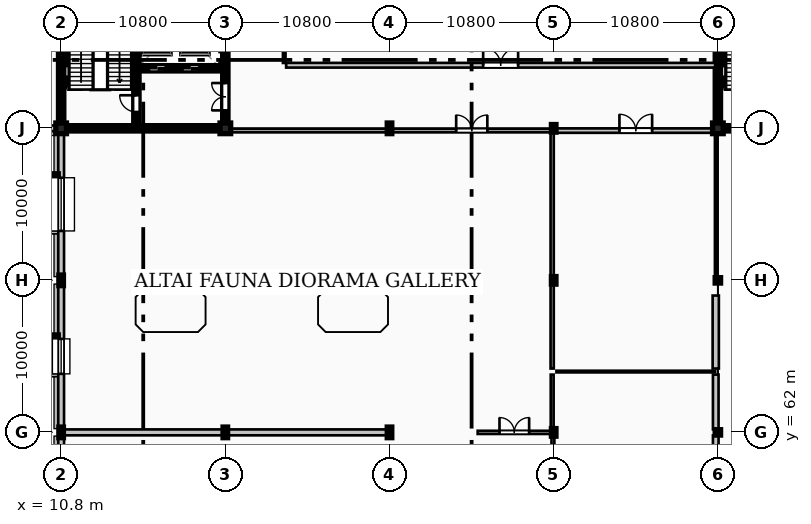
"""IFC4 building model, lengths in metres.
Left out: names, types, materials, properties, quantities, classifications, styles, units other than length and angle.
Written with IfcOpenShell. Run it as: python <this file> out.ifc"""

import sys

from ifc_helpers import new_model, si_unit, direction, frame, frame_2d, origin, origin_2d, place, context, subcontext, project, spatial, rectangle, hollow_circle, i_section, extrude, element, fill, save


model = new_model("IFC4")
c1 = context("Model", 3, precision=1e-05, world=origin(), true_north=direction((0.0, 1.0)))
c2 = subcontext(c1, "Body", "Model", "MODEL_VIEW")
j1 = project(units=[si_unit("LENGTHUNIT", "METRE"), si_unit("PLANEANGLEUNIT", "RADIAN")], contexts=[c1])
p1 = place(None, origin())
s1 = spatial("IfcSite", under=j1, at=p1, CompositionType="ELEMENT")
p2 = place(p1, origin())
s2 = spatial("IfcBuilding", under=s1, at=p2, CompositionType="ELEMENT")
p3 = place(p2, frame((0.0, 0.0, 4.8)))
s3 = spatial("IfcBuildingStorey", under=s2, at=p3, CompositionType="ELEMENT", Elevation=4.8)
for number, where, z_axis, x_axis in (
    (1, (10.8, 62.0, 0.0), (0.0, 0.0, 1.0), (1.0, 0.0, 0.0)),
    (2, (10.8, 72.0, 0.0), (0.0, 0.0, 1.0), (1.0, 0.0, 0.0)),
):
    element("IfcColumn", number, at=place(p3, frame(where, z_axis=z_axis, x_axis=x_axis)), inside=s3, PredefinedType="COLUMN", context=c2, shape_type="SweptSolid", body=[
        extrude(i_section(OverallWidth=0.3, OverallDepth=0.7, WebThickness=0.017, FlangeThickness=0.032, FilletRadius=0.027, at=origin_2d()), origin(), (0.0, 0.0, 1.0), 4.8),
    ])
p4 = place(p3, frame((10.8, 82.0, 0.0), z_axis=(0.0, 0.0, 1.0), x_axis=(1.0, 0.0, 0.0)))
e3 = element("IfcColumn", 3, at=p4, inside=s3, PredefinedType="COLUMN", context=c2, shape_type="SweptSolid", body=[
    extrude(rectangle(XDim=0.7, YDim=0.7, at=origin_2d()), origin(), (0.0, 0.0, 1.0), 4.8),
])
for number, where, z_axis, x_axis in (
    (4, (21.6, 62.0, 0.0), (0.0, 0.0, 1.0), (1.0, 0.0, 0.0)),
    (5, (21.6, 72.0, 0.0), (0.0, 0.0, 1.0), (1.0, 0.0, 0.0)),
):
    element("IfcColumn", number, at=place(p3, frame(where, z_axis=z_axis, x_axis=x_axis)), inside=s3, PredefinedType="COLUMN", context=c2, shape_type="SweptSolid", body=[
        extrude(i_section(OverallWidth=0.3, OverallDepth=0.7, WebThickness=0.017, FlangeThickness=0.032, FilletRadius=0.027, at=origin_2d()), origin(), (0.0, 0.0, 1.0), 4.8),
    ])
p5 = place(p3, frame((21.6, 82.0, 0.0), z_axis=(0.0, 0.0, 1.0), x_axis=(1.0, 0.0, 0.0)))
e6 = element("IfcColumn", 6, at=p5, inside=s3, PredefinedType="COLUMN", context=c2, shape_type="SweptSolid", body=[
    extrude(rectangle(XDim=0.7, YDim=0.7, at=origin_2d()), origin(), (0.0, 0.0, 1.0), 4.8),
])
for number, where, z_axis, x_axis in (
    (7, (32.4, 62.0, 0.0), (0.0, 0.0, 1.0), (1.0, 0.0, 0.0)),
    (8, (32.4, 72.0, 0.0), (0.0, 0.0, 1.0), (1.0, 0.0, 0.0)),
    (9, (32.4, 82.0, 0.0), (0.0, 0.0, 1.0), (1.0, 0.0, 0.0)),
):
    element("IfcColumn", number, at=place(p3, frame(where, z_axis=z_axis, x_axis=x_axis)), inside=s3, PredefinedType="COLUMN", context=c2, shape_type="SweptSolid", body=[
        extrude(i_section(OverallWidth=0.3, OverallDepth=0.7, WebThickness=0.017, FlangeThickness=0.032, FilletRadius=0.027, at=origin_2d()), origin(), (0.0, 0.0, 1.0), 4.8),
    ])
for number, where, z_axis, x_axis in (
    (10, (43.2, 62.0, 0.0), (0.0, 0.0, 1.0), (1.0, 0.0, 0.0)),
    (11, (43.2, 72.0, 0.0), (0.0, 0.0, 1.0), (1.0, 0.0, 0.0)),
    (12, (43.2, 82.0, 0.0), (0.0, 0.0, 1.0), (1.0, 0.0, 0.0)),
):
    element("IfcColumn", number, at=place(p3, frame(where, z_axis=z_axis, x_axis=x_axis)), inside=s3, PredefinedType="COLUMN", context=c2, shape_type="SweptSolid", body=[
        extrude(i_section(OverallWidth=0.3, OverallDepth=0.5, WebThickness=0.014, FlangeThickness=0.028, FilletRadius=0.027, at=origin_2d()), origin(), (0.0, 0.0, 1.0), 4.8),
    ])
for number, where, z_axis, x_axis in (
    (13, (54.0, 62.0, 0.0), (0.0, 0.0, 1.0), (1.0, 0.0, 0.0)),
    (14, (54.0, 72.0, 0.0), (0.0, 0.0, 1.0), (1.0, 0.0, 0.0)),
):
    element("IfcColumn", number, at=place(p3, frame(where, z_axis=z_axis, x_axis=x_axis)), inside=s3, PredefinedType="COLUMN", context=c2, shape_type="SweptSolid", body=[
        extrude(hollow_circle(Radius=0.178, WallThickness=0.016, at=origin_2d()), origin(), (0.0, 0.0, 1.0), 4.8),
    ])
p6 = place(p3, frame((54.0, 82.0, 0.0), z_axis=(0.0, 0.0, 1.0), x_axis=(1.0, 0.0, 0.0)))
e15 = element("IfcColumn", 15, at=p6, inside=s3, PredefinedType="COLUMN", context=c2, shape_type="SweptSolid", body=[
    extrude(rectangle(XDim=0.7, YDim=0.7, at=origin_2d()), origin(), (0.0, 0.0, 1.0), 4.8),
])
p7 = place(p3, frame((0.145, 82.0, 0.0), z_axis=(0.0, 0.0, 1.0), x_axis=(1.0, 0.0, 0.0)))
e16 = element("IfcWall", 16, at=p7, inside=s3, PredefinedType="STANDARD", context=c2, shape_type="SweptSolid", body=[
    extrude(rectangle(XDim=10.51, YDim=0.38, at=frame_2d((5.255, 0.0))), origin(), (0.0, 0.0, 1.0), 3.939),
])
p8 = place(p7, frame((3.805, 0.0, 1.0)))
e17 = element("IfcOpeningElement", 17, at=p8, cuts=e16, PredefinedType="OPENING", context=c2, shape_type="SweptSolid", body=[
    extrude(rectangle(XDim=2.9, YDim=2.5, at=frame_2d((1.45, 1.25))), frame((0.0, 0.2, 0.0), z_axis=(0.0, -1.0, 0.0), x_axis=(1.0, 0.0, 0.0)), (0.0, 0.0, 1.0), 0.4),
])
p9 = place(p3, frame((10.8, 81.855, 0.0), z_axis=(0.0, 0.0, 1.0), x_axis=(0.0, -1.0, 0.0)))
e18 = element("IfcWall", 18, at=p9, inside=s3, PredefinedType="STANDARD", context=c2, shape_type="SweptSolid", body=[
    extrude(rectangle(XDim=9.71, YDim=0.38, at=frame_2d((4.855, 0.0))), origin(), (0.0, 0.0, 1.0), 4.04),
])
p10 = place(p9, frame((3.105, 0.0, 1.0)))
e19 = element("IfcOpeningElement", 19, at=p10, cuts=e18, PredefinedType="OPENING", context=c2, shape_type="SweptSolid", body=[
    extrude(rectangle(XDim=3.5, YDim=2.3, at=frame_2d((1.75, 1.15))), frame((0.0, 0.2, 0.0), z_axis=(0.0, -1.0, 0.0), x_axis=(1.0, 0.0, 0.0)), (0.0, 0.0, 1.0), 0.4),
])
p11 = place(p3, frame((10.8, 71.855, 0.0), z_axis=(0.0, 0.0, 1.0), x_axis=(0.0, -1.0, 0.0)))
e20 = element("IfcWall", 20, at=p11, inside=s3, PredefinedType="STANDARD", context=c2, shape_type="SweptSolid", body=[
    extrude(rectangle(XDim=9.71, YDim=0.38, at=frame_2d((4.855, 0.0))), origin(), (0.0, 0.0, 1.0), 4.04),
])
p12 = place(p11, frame((3.705, 0.0, 1.0)))
e21 = element("IfcOpeningElement", 21, at=p12, cuts=e20, PredefinedType="OPENING", context=c2, shape_type="SweptSolid", body=[
    extrude(rectangle(XDim=2.3, YDim=2.3, at=frame_2d((1.15, 1.15))), frame((0.0, 0.2, 0.0), z_axis=(0.0, -1.0, 0.0), x_axis=(1.0, 0.0, 0.0)), (0.0, 0.0, 1.0), 0.4),
])
p13 = place(p3, frame((10.8, 61.855, 0.0), z_axis=(0.0, 0.0, 1.0), x_axis=(0.0, -1.0, 0.0)))
e22 = element("IfcWall", 22, at=p13, inside=s3, PredefinedType="STANDARD", context=c2, shape_type="SweptSolid", body=[
    extrude(rectangle(XDim=11.71, YDim=0.38, at=frame_2d((5.855, 0.0))), origin(), (0.0, 0.0, 1.0), 3.939),
])
p14 = place(p13, frame((3.855, 0.0, 1.0)))
e23 = element("IfcOpeningElement", 23, at=p14, cuts=e22, PredefinedType="OPENING", context=c2, shape_type="SweptSolid", body=[
    extrude(rectangle(XDim=4.0, YDim=2.6, at=frame_2d((2.0, 1.3))), frame((0.0, 0.2, 0.0), z_axis=(0.0, -1.0, 0.0), x_axis=(1.0, 0.0, 0.0)), (0.0, 0.0, 1.0), 0.4),
])
p15 = place(p3, frame((11.15, 82.0, 0.0), z_axis=(0.0, 0.0, 1.0), x_axis=(1.0, 0.0, 0.0)))
e24 = element("IfcWall", 24, at=p15, inside=s3, PredefinedType="SHEAR", context=c2, shape_type="SweptSolid", body=[
    extrude(rectangle(XDim=10.1, YDim=0.35, at=frame_2d((5.05, 0.0))), origin(), (0.0, 0.0, 1.0), 4.56),
])
p16 = place(p3, frame((10.8, 82.35, 0.0), z_axis=(0.0, 0.0, 1.0), x_axis=(0.0, 1.0, 0.0)))
e25 = element("IfcWall", 25, at=p16, inside=s3, PredefinedType="SHEAR", context=c2, shape_type="SweptSolid", body=[
    extrude(rectangle(XDim=9.3, YDim=0.35, at=frame_2d((4.65, 0.0))), origin(), (0.0, 0.0, 1.0), 4.56),
])
p17 = place(p3, frame((21.6, 82.35, 0.0), z_axis=(0.0, 0.0, 1.0), x_axis=(0.0, 1.0, 0.0)))
e26 = element("IfcWall", 26, at=p17, inside=s3, PredefinedType="SHEAR", context=c2, shape_type="SweptSolid", body=[
    extrude(rectangle(XDim=9.3, YDim=0.35, at=frame_2d((4.65, 0.0))), origin(), (0.0, 0.0, 1.0), 4.56),
])
p18 = place(p17, frame((0.83, 0.0, 0.0)))
e27 = element("IfcOpeningElement", 27, at=p18, cuts=e26, PredefinedType="OPENING", context=c2, shape_type="SweptSolid", body=[
    extrude(rectangle(XDim=1.8, YDim=2.25, at=frame_2d((0.9, 1.125))), frame((0.0, 0.185, 0.0), z_axis=(0.0, -1.0, 0.0), x_axis=(1.0, 0.0, 0.0)), (0.0, 0.0, 1.0), 0.37),
])
p19 = place(p3, frame((15.75, 82.175, 0.0), z_axis=(0.0, 0.0, 1.0), x_axis=(0.0, 1.0, 0.0)))
e28 = element("IfcWall", 28, at=p19, inside=s3, PredefinedType="SHEAR", context=c2, shape_type="SweptSolid", body=[
    extrude(rectangle(XDim=9.65, YDim=0.35, at=frame_2d((4.825, 0.0))), origin(), (0.0, 0.0, 1.0), 4.56),
])
p20 = place(p19, frame((0.9, 0.0, 0.0)))
e29 = element("IfcOpeningElement", 29, at=p20, cuts=e28, PredefinedType="OPENING", context=c2, shape_type="SweptSolid", body=[
    extrude(rectangle(XDim=1.1, YDim=2.2, at=frame_2d((0.55, 1.1))), frame((0.0, 0.185, 0.0), z_axis=(0.0, -1.0, 0.0), x_axis=(1.0, 0.0, 0.0)), (0.0, 0.0, 1.0), 0.37),
])
p21 = place(p3, frame((15.93, 85.95, 0.0), z_axis=(0.0, 0.0, 1.0), x_axis=(1.0, 0.0, 0.0)))
e30 = element("IfcWall", 30, at=p21, inside=s3, PredefinedType="SHEAR", context=c2, shape_type="SweptSolid", body=[
    extrude(rectangle(XDim=5.49, YDim=0.35, at=frame_2d((2.745, 0.0))), origin(), (0.0, 0.0, 1.0), 4.56),
])
p22 = place(p21, frame((0.65, 0.0, 0.0)))
e31 = element("IfcOpeningElement", 31, at=p22, cuts=e30, PredefinedType="OPENING", context=c2, shape_type="SweptSolid", body=[
    extrude(rectangle(XDim=1.1, YDim=2.2, at=frame_2d((0.55, 1.1))), frame((0.0, 0.185, 0.0), z_axis=(0.0, -1.0, 0.0), x_axis=(1.0, 0.0, 0.0)), (0.0, 0.0, 1.0), 0.37),
])
p23 = place(p21, frame((2.85, 0.0, 0.0)))
e32 = element("IfcOpeningElement", 32, at=p23, cuts=e30, PredefinedType="OPENING", context=c2, shape_type="SweptSolid", body=[
    extrude(rectangle(XDim=1.1, YDim=2.2, at=frame_2d((0.55, 1.1))), frame((0.0, 0.185, 0.0), z_axis=(0.0, -1.0, 0.0), x_axis=(1.0, 0.0, 0.0)), (0.0, 0.0, 1.0), 0.37),
])
p24 = place(p3, frame((54.35, 82.0, 0.0), z_axis=(0.0, 0.0, 1.0), x_axis=(1.0, 0.0, 0.0)))
e33 = element("IfcWall", 33, at=p24, inside=s3, PredefinedType="SHEAR", context=c2, shape_type="SweptSolid", body=[
    extrude(rectangle(XDim=10.1, YDim=0.35, at=frame_2d((5.05, 0.0))), origin(), (0.0, 0.0, 1.0), 4.56),
])
p25 = place(p3, frame((54.0, 82.35, 0.0), z_axis=(0.0, 0.0, 1.0), x_axis=(0.0, 1.0, 0.0)))
e34 = element("IfcWall", 34, at=p25, inside=s3, PredefinedType="SHEAR", context=c2, shape_type="SweptSolid", body=[
    extrude(rectangle(XDim=9.3, YDim=0.35, at=frame_2d((4.65, 0.0))), origin(), (0.0, 0.0, 1.0), 4.56),
])
p26 = place(p3, frame((38.2, 62.0, 0.0), z_axis=(0.0, 0.0, 1.0), x_axis=(1.0, 0.0, 0.0)))
e35 = element("IfcWall", 35, at=p26, inside=s3, PredefinedType="PARTITIONING", context=c2, shape_type="SweptSolid", body=[
    extrude(rectangle(XDim=4.82, YDim=0.21, at=frame_2d((2.41, 0.0))), origin(), (0.0, 0.0, 1.0), 4.049),
])
p27 = place(p26, frame((1.435, 0.0, 0.0)))
e36 = element("IfcOpeningElement", 36, at=p27, cuts=e35, PredefinedType="OPENING", context=c2, shape_type="SweptSolid", body=[
    extrude(rectangle(XDim=1.95, YDim=2.5, at=frame_2d((0.975, 1.25))), frame((0.0, 0.115, 0.0), z_axis=(0.0, -1.0, 0.0), x_axis=(1.0, 0.0, 0.0)), (0.0, 0.0, 1.0), 0.23),
])
p28 = place(p3, frame((21.78, 81.85, 0.0), z_axis=(0.0, 0.0, 1.0), x_axis=(1.0, 0.0, 0.0)))
e37 = element("IfcWall", 37, at=p28, inside=s3, PredefinedType="PARTITIONING", context=c2, shape_type="SweptSolid", body=[
    extrude(rectangle(XDim=10.42, YDim=0.23, at=frame_2d((5.21, 0.0))), origin(), (0.0, 0.0, 1.0), 3.939),
])
p29 = place(p3, frame((32.6, 81.85, 0.0), z_axis=(0.0, 0.0, 1.0), x_axis=(1.0, 0.0, 0.0)))
e38 = element("IfcWall", 38, at=p29, inside=s3, PredefinedType="PARTITIONING", context=c2, shape_type="SweptSolid", body=[
    extrude(rectangle(XDim=10.42, YDim=0.23, at=frame_2d((5.21, 0.0))), origin(), (0.0, 0.0, 1.0), 4.04),
])
p30 = place(p29, frame((4.185, 0.0, 0.0)))
e39 = element("IfcOpeningElement", 39, at=p30, cuts=e38, PredefinedType="OPENING", context=c2, shape_type="SweptSolid", body=[
    extrude(rectangle(XDim=2.05, YDim=2.55, at=frame_2d((1.025, 1.275))), frame((0.0, 0.125, 0.0), z_axis=(0.0, -1.0, 0.0), x_axis=(1.0, 0.0, 0.0)), (0.0, 0.0, 1.0), 0.25),
])
p31 = place(p3, frame((43.38, 81.85, 0.0), z_axis=(0.0, 0.0, 1.0), x_axis=(1.0, 0.0, 0.0)))
e40 = element("IfcWall", 40, at=p31, inside=s3, PredefinedType="PARTITIONING", context=c2, shape_type="SweptSolid", body=[
    extrude(rectangle(XDim=10.44, YDim=0.29, at=frame_2d((5.22, 0.0))), origin(), (0.0, 0.0, 1.0), 4.04),
])
p32 = place(p31, frame((4.145, 0.0, 0.0)))
e41 = element("IfcOpeningElement", 41, at=p32, cuts=e40, PredefinedType="OPENING", context=c2, shape_type="SweptSolid", body=[
    extrude(rectangle(XDim=2.15, YDim=2.6, at=frame_2d((1.075, 1.3))), frame((0.0, 0.155, 0.0), z_axis=(0.0, -1.0, 0.0), x_axis=(1.0, 0.0, 0.0)), (0.0, 0.0, 1.0), 0.31),
])
p33 = place(p3, frame((25.6, 86.15, 0.0), z_axis=(0.0, 0.0, 1.0), x_axis=(1.0, 0.0, 0.0)))
e42 = element("IfcWall", 42, at=p33, inside=s3, PredefinedType="PARTITIONING", context=c2, shape_type="SweptSolid", body=[
    extrude(rectangle(XDim=28.22, YDim=0.31, at=frame_2d((14.11, 0.0))), origin(), (0.0, 0.0, 1.0), 4.52),
])
p34 = place(p33, frame((12.96, 0.0, 0.0)))
e43 = element("IfcOpeningElement", 43, at=p34, cuts=e42, PredefinedType="OPENING", context=c2, shape_type="SweptSolid", body=[
    extrude(rectangle(XDim=2.3, YDim=2.65, at=frame_2d((1.15, 1.325))), frame((0.0, 0.165, 0.0), z_axis=(0.0, -1.0, 0.0), x_axis=(1.0, 0.0, 0.0)), (0.0, 0.0, 1.0), 0.33),
])
p35 = place(p3, frame((25.475, 86.3, 0.0), z_axis=(0.0, 0.0, 1.0), x_axis=(0.0, 1.0, 0.0)))
e44 = element("IfcWall", 44, at=p35, inside=s3, PredefinedType="PARTITIONING", context=c2, shape_type="SweptSolid", body=[
    extrude(rectangle(XDim=5.52, YDim=0.17, at=frame_2d((2.76, 0.0))), origin(), (0.0, 0.0, 1.0), 4.52),
])
p36 = place(p35, frame((2.17, 0.0, 0.0)))
e45 = element("IfcOpeningElement", 45, at=p36, cuts=e44, PredefinedType="OPENING", context=c2, shape_type="SweptSolid", body=[
    extrude(rectangle(XDim=1.18, YDim=2.28, at=frame_2d((0.59, 1.14))), frame((0.0, 0.095, 0.0), z_axis=(0.0, -1.0, 0.0), x_axis=(1.0, 0.0, 0.0)), (0.0, 0.0, 1.0), 0.19),
])
p37 = place(p3, frame((43.15, 50.18, 0.0), z_axis=(0.0, 0.0, 1.0), x_axis=(0.0, 1.0, 0.0)))
e46 = element("IfcWall", 46, at=p37, inside=s3, PredefinedType="PARTITIONING", context=c2, shape_type="SweptSolid", body=[
    extrude(rectangle(XDim=11.64, YDim=0.19, at=frame_2d((5.82, 0.0))), origin(), (0.0, 0.0, 1.0), 3.939),
])
p38 = place(p37, frame((5.18, 0.0, 0.0)))
e47 = element("IfcOpeningElement", 47, at=p38, cuts=e46, PredefinedType="OPENING", context=c2, shape_type="SweptSolid", body=[
    extrude(rectangle(XDim=1.28, YDim=2.32, at=frame_2d((0.64, 1.16))), frame((0.0, 0.105, 0.0), z_axis=(0.0, -1.0, 0.0), x_axis=(1.0, 0.0, 0.0)), (0.0, 0.0, 1.0), 0.21),
])
p39 = place(p3, frame((10.98, 62.0, 0.0), z_axis=(0.0, 0.0, 1.0), x_axis=(1.0, 0.0, 0.0)))
e48 = element("IfcWall", 48, at=p39, inside=s3, PredefinedType="PARTITIONING", context=c2, shape_type="SweptSolid", body=[
    extrude(rectangle(XDim=10.42, YDim=0.39, at=frame_2d((5.21, 0.0))), origin(), (0.0, 0.0, 1.0), 3.939),
])
p40 = place(p3, frame((21.8, 62.0, 0.0), z_axis=(0.0, 0.0, 1.0), x_axis=(1.0, 0.0, 0.0)))
e49 = element("IfcWall", 49, at=p40, inside=s3, PredefinedType="PARTITIONING", context=c2, shape_type="SweptSolid", body=[
    extrude(rectangle(XDim=10.4, YDim=0.39, at=frame_2d((5.2, 0.0))), origin(), (0.0, 0.0, 1.0), 3.939),
])
p41 = place(p3, frame((43.38, 66.0, 0.0), z_axis=(0.0, 0.0, 1.0), x_axis=(1.0, 0.0, 0.0)))
e50 = element("IfcWall", 50, at=p41, inside=s3, PredefinedType="PARTITIONING", context=c2, shape_type="SweptSolid", body=[
    extrude(rectangle(XDim=10.44, YDim=0.11, at=frame_2d((5.22, 0.0))), origin(), (0.0, 0.0, 1.0), 4.52),
])
p42 = place(p3, frame((43.1, 62.18, 0.0), z_axis=(0.0, 0.0, 1.0), x_axis=(0.0, 1.0, 0.0)))
e51 = element("IfcWall", 51, at=p42, inside=s3, PredefinedType="PARTITIONING", context=c2, shape_type="SweptSolid", body=[
    extrude(rectangle(XDim=3.62, YDim=0.19, at=frame_2d((1.81, 0.0))), origin(), (0.0, 0.0, 1.0), 4.04),
])
p43 = place(p3, frame((43.1, 66.2, 0.0), z_axis=(0.0, 0.0, 1.0), x_axis=(0.0, 1.0, 0.0)))
e52 = element("IfcWall", 52, at=p43, inside=s3, PredefinedType="PARTITIONING", context=c2, shape_type="SweptSolid", body=[
    extrude(rectangle(XDim=5.6, YDim=0.21, at=frame_2d((2.8, 0.0))), origin(), (0.0, 0.0, 1.0), 4.04),
])
p44 = place(p3, frame((43.1, 72.2, 0.0), z_axis=(0.0, 0.0, 1.0), x_axis=(0.0, 1.0, 0.0)))
e53 = element("IfcWall", 53, at=p44, inside=s3, PredefinedType="PARTITIONING", context=c2, shape_type="SweptSolid", body=[
    extrude(rectangle(XDim=9.62, YDim=0.21, at=frame_2d((4.81, 0.0))), origin(), (0.0, 0.0, 1.0), 4.04),
])
p45 = place(p3, frame((53.86, 51.0, 0.0), z_axis=(0.0, 0.0, 1.0), x_axis=(0.0, 1.0, 0.0)))
e54 = element("IfcWall", 54, at=p45, inside=s3, PredefinedType="PARTITIONING", context=c2, shape_type="SweptSolid", body=[
    extrude(rectangle(XDim=10.8, YDim=0.37, at=frame_2d((5.4, 0.0))), origin(), (0.0, 0.0, 1.0), 4.52),
])
p46 = place(p3, frame((53.86, 62.2, 0.0), z_axis=(0.0, 0.0, 1.0), x_axis=(0.0, 1.0, 0.0)))
e55 = element("IfcWall", 55, at=p46, inside=s3, PredefinedType="PARTITIONING", context=c2, shape_type="SweptSolid", body=[
    extrude(rectangle(XDim=3.6, YDim=0.37, at=frame_2d((1.8, 0.0))), origin(), (0.0, 0.0, 1.0), 4.52),
])
p47 = place(p3, frame((53.86, 66.2, 0.0), z_axis=(0.0, 0.0, 1.0), x_axis=(0.0, 1.0, 0.0)))
e56 = element("IfcWall", 56, at=p47, inside=s3, PredefinedType="PARTITIONING", context=c2, shape_type="SweptSolid", body=[
    extrude(rectangle(XDim=4.8, YDim=0.41, at=frame_2d((2.4, 0.0))), origin(), (0.0, 0.0, 1.0), 4.52),
])
p48 = place(p3, frame((53.86, 72.2, 0.0), z_axis=(0.0, 0.0, 1.0), x_axis=(0.0, 1.0, 0.0)))
e57 = element("IfcWall", 57, at=p48, inside=s3, PredefinedType="PARTITIONING", context=c2, shape_type="SweptSolid", body=[
    extrude(rectangle(XDim=9.62, YDim=0.11, at=frame_2d((4.81, 0.0))), origin(), (0.0, 0.0, 1.0), 4.52),
])
p49 = place(p10, origin())
e58 = element("IfcWindow", 58, at=p49, inside=s3, PartitioningType="SINGLE_PANEL", PredefinedType="WINDOW", context=c2, shape_type="SweptSolid", body=[
    extrude(rectangle(XDim=3.5, YDim=2.3, at=frame_2d((1.75, 1.15))), frame((0.0, 0.03, 0.0), z_axis=(0.0, -1.0, 0.0), x_axis=(1.0, 0.0, 0.0)), (0.0, 0.0, 1.0), 0.06),
])
fill(e19, e58)
p50 = place(p12, origin())
e59 = element("IfcWindow", 59, at=p50, inside=s3, PartitioningType="SINGLE_PANEL", PredefinedType="WINDOW", context=c2, shape_type="SweptSolid", body=[
    extrude(rectangle(XDim=2.3, YDim=2.3, at=frame_2d((1.15, 1.15))), frame((0.0, 0.03, 0.0), z_axis=(0.0, -1.0, 0.0), x_axis=(1.0, 0.0, 0.0)), (0.0, 0.0, 1.0), 0.06),
])
fill(e21, e59)
p51 = place(p20, origin())
e60 = element("IfcDoor", 60, at=p51, inside=s3, OperationType="SINGLE_SWING_RIGHT", PredefinedType="DOOR", context=c2, shape_type="SweptSolid", body=[
    extrude(rectangle(XDim=1.1, YDim=2.2, at=frame_2d((0.55, 1.1))), frame((0.0, 0.025, 0.0), z_axis=(0.0, -1.0, 0.0), x_axis=(1.0, 0.0, 0.0)), (0.0, 0.0, 1.0), 0.05),
])
fill(e29, e60)
p52 = place(p18, origin())
e61 = element("IfcDoor", 61, at=p52, inside=s3, OperationType="DOUBLE_DOOR_SINGLE_SWING", PredefinedType="DOOR", context=c2, shape_type="SweptSolid", body=[
    extrude(rectangle(XDim=1.8, YDim=2.25, at=frame_2d((0.9, 1.125))), frame((0.0, 0.025, 0.0), z_axis=(0.0, -1.0, 0.0), x_axis=(1.0, 0.0, 0.0)), (0.0, 0.0, 1.0), 0.05),
])
fill(e27, e61)
p53 = place(p22, origin())
e62 = element("IfcDoor", 62, at=p53, inside=s3, OperationType="DOUBLE_DOOR_SLIDING", PredefinedType="DOOR", context=c2, shape_type="SweptSolid", body=[
    extrude(rectangle(XDim=1.1, YDim=2.2, at=frame_2d((0.55, 1.1))), frame((0.0, 0.025, 0.0), z_axis=(0.0, -1.0, 0.0), x_axis=(1.0, 0.0, 0.0)), (0.0, 0.0, 1.0), 0.05),
])
fill(e31, e62)
p54 = place(p23, origin())
e63 = element("IfcDoor", 63, at=p54, inside=s3, OperationType="DOUBLE_DOOR_SLIDING", PredefinedType="DOOR", context=c2, shape_type="SweptSolid", body=[
    extrude(rectangle(XDim=1.1, YDim=2.2, at=frame_2d((0.55, 1.1))), frame((0.0, 0.025, 0.0), z_axis=(0.0, -1.0, 0.0), x_axis=(1.0, 0.0, 0.0)), (0.0, 0.0, 1.0), 0.05),
])
fill(e32, e63)
p55 = place(p27, origin())
e64 = element("IfcDoor", 64, at=p55, inside=s3, OperationType="DOUBLE_DOOR_SINGLE_SWING", PredefinedType="DOOR", context=c2, shape_type="SweptSolid", body=[
    extrude(rectangle(XDim=1.95, YDim=2.5, at=frame_2d((0.975, 1.25))), frame((0.0, 0.025, 0.0), z_axis=(0.0, -1.0, 0.0), x_axis=(1.0, 0.0, 0.0)), (0.0, 0.0, 1.0), 0.05),
])
fill(e36, e64)
p56 = place(p30, origin())
e65 = element("IfcDoor", 65, at=p56, inside=s3, OperationType="DOUBLE_DOOR_SINGLE_SWING", PredefinedType="DOOR", context=c2, shape_type="SweptSolid", body=[
    extrude(rectangle(XDim=2.05, YDim=2.55, at=frame_2d((1.025, 1.275))), frame((0.0, 0.025, 0.0), z_axis=(0.0, -1.0, 0.0), x_axis=(1.0, 0.0, 0.0)), (0.0, 0.0, 1.0), 0.05),
])
fill(e39, e65)
p57 = place(p32, origin())
e66 = element("IfcDoor", 66, at=p57, inside=s3, OperationType="DOUBLE_DOOR_SINGLE_SWING", PredefinedType="DOOR", context=c2, shape_type="SweptSolid", body=[
    extrude(rectangle(XDim=2.15, YDim=2.6, at=frame_2d((1.075, 1.3))), frame((0.0, 0.025, 0.0), z_axis=(0.0, -1.0, 0.0), x_axis=(1.0, 0.0, 0.0)), (0.0, 0.0, 1.0), 0.05),
])
fill(e41, e66)
p58 = place(p34, origin())
e67 = element("IfcDoor", 67, at=p58, inside=s3, OperationType="DOUBLE_DOOR_SINGLE_SWING", PredefinedType="DOOR", context=c2, shape_type="SweptSolid", body=[
    extrude(rectangle(XDim=2.3, YDim=2.65, at=frame_2d((1.15, 1.325))), frame((0.0, 0.025, 0.0), z_axis=(0.0, -1.0, 0.0), x_axis=(1.0, 0.0, 0.0)), (0.0, 0.0, 1.0), 0.05),
])
fill(e43, e67)
save(model, sys.argv[1])
